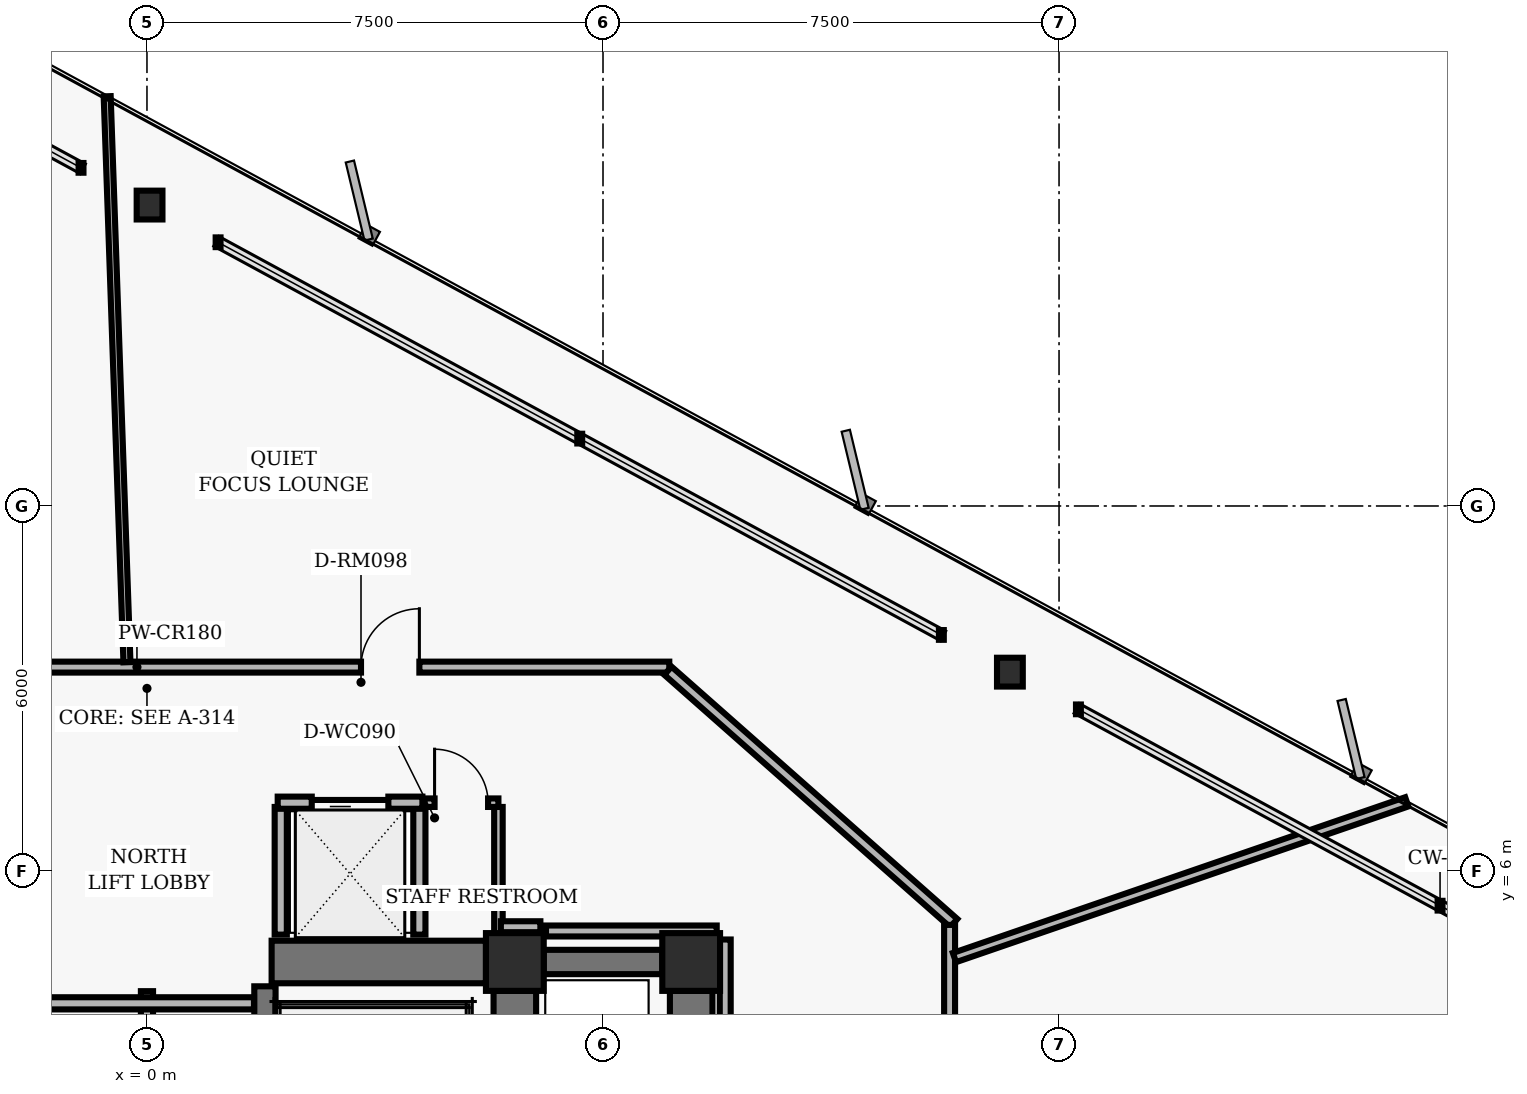
"""IFC4 building model, lengths in metres.
Left out: names, types, materials, properties, quantities, classifications, styles, units other than length and angle.
Written with IfcOpenShell. Run it as: python <this file> out.ifc"""

import sys

from ifc_helpers import new_model, si_unit, direction, frame, frame_2d, origin, origin_2d, place, context, subcontext, project, spatial, rectangle, hollow_rectangle, i_section, extrude, element, fill, save


model = new_model("IFC4")
c1 = context("Model", 3, precision=1e-05, world=origin(), true_north=direction((0.0, 1.0)))
c2 = subcontext(c1, "Body", "Model", "MODEL_VIEW")
j1 = project(units=[si_unit("LENGTHUNIT", "METRE"), si_unit("PLANEANGLEUNIT", "RADIAN")], contexts=[c1])
p1 = place(None, origin())
s1 = spatial("IfcSite", under=j1, at=p1, CompositionType="ELEMENT")
p2 = place(p1, origin())
s2 = spatial("IfcBuilding", under=s1, at=p2, CompositionType="ELEMENT")
p3 = place(p2, frame((0.0, 0.0, 42.4)))
s3 = spatial("IfcBuildingStorey", under=s2, at=p3, CompositionType="ELEMENT", Elevation=42.4)
for number, where, z_axis, x_axis in (
    (1, (6.05, 4.5, 0.0), (0.0, 0.0, 1.0), (1.0, 0.0, 0.0)),
    (2, (8.95, 4.5, 0.0), (0.0, 0.0, 1.0), (1.0, 0.0, 0.0)),
):
    element("IfcColumn", number, at=place(p3, frame(where, z_axis=z_axis, x_axis=x_axis)), inside=s3, PredefinedType="COLUMN", context=c2, shape_type="SweptSolid", body=[
        extrude(hollow_rectangle(XDim=0.95, YDim=0.95, WallThickness=0.06, InnerFilletRadius=0.02, OuterFilletRadius=0.04, at=origin_2d()), origin(), (0.0, 0.0, 1.0), 3.36),
    ])
p4 = place(p3, frame((6.05, 0.475, 0.0), z_axis=(0.0, 0.0, 1.0), x_axis=(0.0, 1.0, 0.0)))
e3 = element("IfcWall", 3, at=p4, inside=s3, PredefinedType="SHEAR", context=c2, shape_type="SweptSolid", body=[
    extrude(rectangle(XDim=3.55, YDim=0.7, at=frame_2d((1.775, 0.0))), origin(), (0.0, 0.0, 1.0), 3.038),
])
p5 = place(p3, frame((1.94, -4.1, 0.0), z_axis=(0.0, 0.0, 1.0), x_axis=(0.0, 1.0, 0.0)))
e4 = element("IfcWall", 4, at=p5, inside=s3, PredefinedType="SHEAR", context=c2, shape_type="SweptSolid", body=[
    extrude(rectangle(XDim=8.2, YDim=0.35, at=frame_2d((4.1, 0.0))), origin(), (0.0, 0.0, 1.0), 3.038),
])
p6 = place(p3, frame((2.05, 4.5, 0.0), z_axis=(0.0, 0.0, 1.0), x_axis=(1.0, 0.0, 0.0)))
e5 = element("IfcWall", 5, at=p6, inside=s3, PredefinedType="SHEAR", context=c2, shape_type="SweptSolid", body=[
    extrude(rectangle(XDim=3.525, YDim=0.7, at=frame_2d((1.762, 0.0))), origin(), (0.0, 0.0, 1.0), 3.038),
])
p7 = place(p3, frame((8.95, -3.825, 0.0), z_axis=(0.0, 0.0, 1.0), x_axis=(0.0, 1.0, 0.0)))
e6 = element("IfcWall", 6, at=p7, inside=s3, PredefinedType="SHEAR", context=c2, shape_type="SweptSolid", body=[
    extrude(rectangle(XDim=7.85, YDim=0.7, at=frame_2d((3.925, 0.0))), origin(), (0.0, 0.0, 1.0), 3.038),
])
p8 = place(p3, frame((6.525, 4.5, 0.0), z_axis=(0.0, 0.0, 1.0), x_axis=(1.0, 0.0, 0.0)))
e7 = element("IfcWall", 7, at=p8, inside=s3, PredefinedType="SHEAR", context=c2, shape_type="SweptSolid", body=[
    extrude(rectangle(XDim=1.95, YDim=0.4, at=frame_2d((0.975, 0.0))), origin(), (0.0, 0.0, 1.0), 3.038),
])
for number, where, z_axis, x_axis in (
    (8, (14.192, 9.267, 0.0), (0.0, 0.0, 1.0), (1.0, 0.0, 0.0)),
    (9, (0.043, 16.949, 0.0), (0.0, 0.0, 1.0), (1.0, 0.0, 0.0)),
):
    element("IfcColumn", number, at=place(p3, frame(where, z_axis=z_axis, x_axis=x_axis)), inside=s3, PredefinedType="COLUMN", context=c2, shape_type="SweptSolid", body=[
        extrude(i_section(OverallWidth=0.424, OverallDepth=0.474, WebThickness=0.048, FlangeThickness=0.077, FilletRadius=0.025, at=origin_2d()), origin(), (0.0, 0.0, 1.0), 3.36),
    ])
p9 = place(p3, frame((0.0, 1.25, 0.0), z_axis=(0.0, 0.0, 1.0), x_axis=(0.0, 1.0, 0.0)))
e10 = element("IfcWall", 10, at=p9, inside=s3, PredefinedType="PARTITIONING", context=c2, shape_type="SweptSolid", body=[
    extrude(rectangle(XDim=2.77, YDim=0.2, at=frame_2d((1.385, 0.0))), origin(), (0.0, 0.0, 1.0), 3.013),
])
p10 = place(p3, frame((-1.76, 3.82, 0.0), z_axis=(0.0, 0.0, 1.0), x_axis=(1.0, 0.0, 0.0)))
e11 = element("IfcWall", 11, at=p10, inside=s3, PredefinedType="PARTITIONING", context=c2, shape_type="SweptSolid", body=[
    extrude(rectangle(XDim=3.52, YDim=0.2, at=frame_2d((1.76, 0.0))), origin(), (0.0, 0.0, 1.0), 3.013),
])
for number, where, z_axis, x_axis in (
    (12, (2.2, 4.95, 0.0), (0.0, 0.0, 1.0), (0.0, 1.0, 0.0)),
    (13, (4.48, 4.95, 0.0), (0.0, 0.0, 1.0), (0.0, 1.0, 0.0)),
):
    element("IfcWall", number, at=place(p3, frame(where, z_axis=z_axis, x_axis=x_axis)), inside=s3, PredefinedType="PARTITIONING", context=c2, shape_type="SweptSolid", body=[
        extrude(rectangle(XDim=2.1, YDim=0.2, at=frame_2d((1.05, 0.0))), origin(), (0.0, 0.0, 1.0), 3.013),
    ])
p11 = place(p3, frame((2.15, 7.12, 0.0), z_axis=(0.0, 0.0, 1.0), x_axis=(1.0, 0.0, 0.0)))
e14 = element("IfcWall", 14, at=p11, inside=s3, PredefinedType="PARTITIONING", context=c2, shape_type="SweptSolid", body=[
    extrude(rectangle(XDim=2.38, YDim=0.2, at=frame_2d((1.19, 0.0))), origin(), (0.0, 0.0, 1.0), 3.013),
])
p12 = place(p11, frame((0.56, 0.0, 0.0)))
e15 = element("IfcOpeningElement", 15, at=p12, cuts=e14, PredefinedType="OPENING", context=c2, shape_type="SweptSolid", body=[
    extrude(rectangle(XDim=1.26, YDim=2.06, at=frame_2d((0.63, 1.03))), frame((0.0, 0.11, 0.0), z_axis=(0.0, -1.0, 0.0), x_axis=(1.0, 0.0, 0.0)), (0.0, 0.0, 1.0), 0.22),
])
p13 = place(p3, frame((5.78, 4.95, 0.0), z_axis=(0.0, 0.0, 1.0), x_axis=(0.0, 1.0, 0.0)))
e16 = element("IfcWall", 16, at=p13, inside=s3, PredefinedType="PARTITIONING", context=c2, shape_type="SweptSolid", body=[
    extrude(rectangle(XDim=2.1, YDim=0.14, at=frame_2d((1.05, 0.0))), origin(), (0.0, 0.0, 1.0), 3.013),
])
p14 = place(p3, frame((4.56, 7.12, 0.0), z_axis=(0.0, 0.0, 1.0), x_axis=(1.0, 0.0, 0.0)))
e17 = element("IfcWall", 17, at=p14, inside=s3, PredefinedType="PARTITIONING", context=c2, shape_type="SweptSolid", body=[
    extrude(rectangle(XDim=1.22, YDim=0.14, at=frame_2d((0.61, 0.0))), origin(), (0.0, 0.0, 1.0), 3.013),
])
p15 = place(p14, frame((0.17, 0.0, 0.0)))
e18 = element("IfcOpeningElement", 18, at=p15, cuts=e17, PredefinedType="OPENING", context=c2, shape_type="SweptSolid", body=[
    extrude(rectangle(XDim=0.88, YDim=2.02, at=frame_2d((0.44, 1.01))), frame((0.0, 0.08, 0.0), z_axis=(0.0, -1.0, 0.0), x_axis=(1.0, 0.0, 0.0)), (0.0, 0.0, 1.0), 0.16),
])
p16 = place(p3, frame((-8.59, 9.35, 0.0), z_axis=(0.0, 0.0, 1.0), x_axis=(1.0, 0.0, 0.0)))
e19 = element("IfcWall", 19, at=p16, inside=s3, PredefinedType="PARTITIONING", context=c2, shape_type="SweptSolid", body=[
    extrude(rectangle(XDim=17.18, YDim=0.18, at=frame_2d((8.59, 0.0))), origin(), (0.0, 0.0, 1.0), 2.527),
])
p17 = place(p16, frame((12.11, 0.0, 0.0)))
e20 = element("IfcOpeningElement", 20, at=p17, cuts=e19, PredefinedType="OPENING", context=c2, shape_type="SweptSolid", body=[
    extrude(rectangle(XDim=0.96, YDim=2.02, at=frame_2d((0.48, 1.01))), frame((0.0, 0.1, 0.0), z_axis=(0.0, -1.0, 0.0), x_axis=(1.0, 0.0, 0.0)), (0.0, 0.0, 1.0), 0.2),
])
p18 = place(p16, frame((3.781, 0.0, 0.0)))
e21 = element("IfcOpeningElement", 21, at=p18, cuts=e19, PredefinedType="OPENING", context=c2, shape_type="SweptSolid", body=[
    extrude(rectangle(XDim=0.96, YDim=2.02, at=frame_2d((0.48, 1.01))), frame((0.0, 0.1, 0.0), z_axis=(0.0, -1.0, 0.0), x_axis=(1.0, 0.0, 0.0)), (0.0, 0.0, 1.0), 0.2),
])
p19 = place(p3, frame((8.567, 9.29, 0.0), z_axis=(0.0, 0.0, 1.0), x_axis=(0.749626463267, -0.66186113768, 0.0)))
e22 = element("IfcWall", 22, at=p19, inside=s3, PredefinedType="PARTITIONING", context=c2, shape_type="SweptSolid", body=[
    extrude(rectangle(XDim=6.27, YDim=0.18, at=frame_2d((3.135, 0.0))), origin(), (0.0, 0.0, 1.0), 2.527),
])
p20 = place(p3, frame((13.2, 5.11, 0.0), z_axis=(0.0, 0.0, 1.0), x_axis=(0.0, -1.0, 0.0)))
e23 = element("IfcWall", 23, at=p20, inside=s3, PredefinedType="PARTITIONING", context=c2, shape_type="SweptSolid", body=[
    extrude(rectangle(XDim=10.22, YDim=0.18, at=frame_2d((5.11, 0.0))), origin(), (0.0, 0.0, 1.0), 3.013),
])
p21 = place(p20, frame((4.6, 0.0, 0.0)))
e24 = element("IfcOpeningElement", 24, at=p21, cuts=e23, PredefinedType="OPENING", context=c2, shape_type="SweptSolid", body=[
    extrude(rectangle(XDim=1.02, YDim=2.02, at=frame_2d((0.51, 1.01))), frame((0.0, 0.1, 0.0), z_axis=(0.0, -1.0, 0.0), x_axis=(1.0, 0.0, 0.0)), (0.0, 0.0, 1.0), 0.2),
])
p22 = place(p3, frame((9.51, -4.87, 0.0), z_axis=(0.0, 0.0, 1.0), x_axis=(0.0, 1.0, 0.0)))
e25 = element("IfcWall", 25, at=p22, inside=s3, PredefinedType="PARTITIONING", context=c2, shape_type="SweptSolid", body=[
    extrude(rectangle(XDim=9.74, YDim=0.18, at=frame_2d((4.87, 0.0))), origin(), (0.0, 0.0, 1.0), 3.013),
])
p23 = place(p3, frame((9.37, 5.01, 0.0), z_axis=(0.0, 0.0, 1.0), x_axis=(-1.0, 0.0, 0.0)))
e26 = element("IfcWall", 26, at=p23, inside=s3, PredefinedType="PARTITIONING", context=c2, shape_type="SweptSolid", body=[
    extrude(rectangle(XDim=2.808, YDim=0.18, at=frame_2d((1.404, 0.0))), origin(), (0.0, 0.0, 1.0), 3.013),
])
p24 = place(p3, frame((6.47, 5.08, 0.0), z_axis=(0.0, 0.0, 1.0), x_axis=(-1.0, 0.0, 0.0)))
e27 = element("IfcWall", 27, at=p24, inside=s3, PredefinedType="PARTITIONING", context=c2, shape_type="SweptSolid", body=[
    extrude(rectangle(XDim=0.65, YDim=0.18, at=frame_2d((0.325, 0.0))), origin(), (0.0, 0.0, 1.0), 3.013),
])
p25 = place(p3, frame((13.28, 4.573, 0.0), z_axis=(0.0, 0.0, 1.0), x_axis=(0.94552490271, 0.325549778613, 0.0)))
e28 = element("IfcWall", 28, at=p25, inside=s3, PredefinedType="PARTITIONING", context=c2, shape_type="SweptSolid", body=[
    extrude(rectangle(XDim=7.867, YDim=0.16, at=frame_2d((3.934, 0.0))), origin(), (0.0, 0.0, 1.0), 3.013),
])
p26 = place(p3, frame((-0.329, 9.43, 0.0), z_axis=(0.0, 0.0, 1.0), x_axis=(-0.034885649993, 0.999391310461, 0.0)))
e29 = element("IfcWall", 29, at=p26, inside=s3, PredefinedType="MOVABLE", context=c2, shape_type="SweptSolid", body=[
    extrude(rectangle(XDim=9.315, YDim=0.115, at=frame_2d((4.657, 0.0))), origin(), (0.0, 0.0, 1.0), 3.013),
])
p27 = place(p12, origin())
e30 = element("IfcDoor", 30, at=p27, inside=s3, OperationType="SLIDING_TO_LEFT", PredefinedType="DOOR", context=c2, shape_type="SweptSolid", body=[
    extrude(rectangle(XDim=1.26, YDim=2.06, at=frame_2d((0.63, 1.03))), frame((0.0, 0.025, 0.0), z_axis=(0.0, -1.0, 0.0), x_axis=(1.0, 0.0, 0.0)), (0.0, 0.0, 1.0), 0.05),
])
fill(e15, e30)
p28 = place(p15, origin())
e31 = element("IfcDoor", 31, at=p28, inside=s3, OperationType="SINGLE_SWING_LEFT", PredefinedType="DOOR", context=c2, shape_type="SweptSolid", body=[
    extrude(rectangle(XDim=0.88, YDim=2.02, at=frame_2d((0.44, 1.01))), frame((0.0, 0.025, 0.0), z_axis=(0.0, -1.0, 0.0), x_axis=(1.0, 0.0, 0.0)), (0.0, 0.0, 1.0), 0.05),
])
fill(e18, e31)
p29 = place(p17, origin())
e32 = element("IfcDoor", 32, at=p29, inside=s3, OperationType="SINGLE_SWING_RIGHT", PredefinedType="DOOR", context=c2, shape_type="SweptSolid", body=[
    extrude(rectangle(XDim=0.96, YDim=2.02, at=frame_2d((0.48, 1.01))), frame((0.0, 0.025, 0.0), z_axis=(0.0, -1.0, 0.0), x_axis=(1.0, 0.0, 0.0)), (0.0, 0.0, 1.0), 0.05),
])
fill(e20, e32)
save(model, sys.argv[1])
